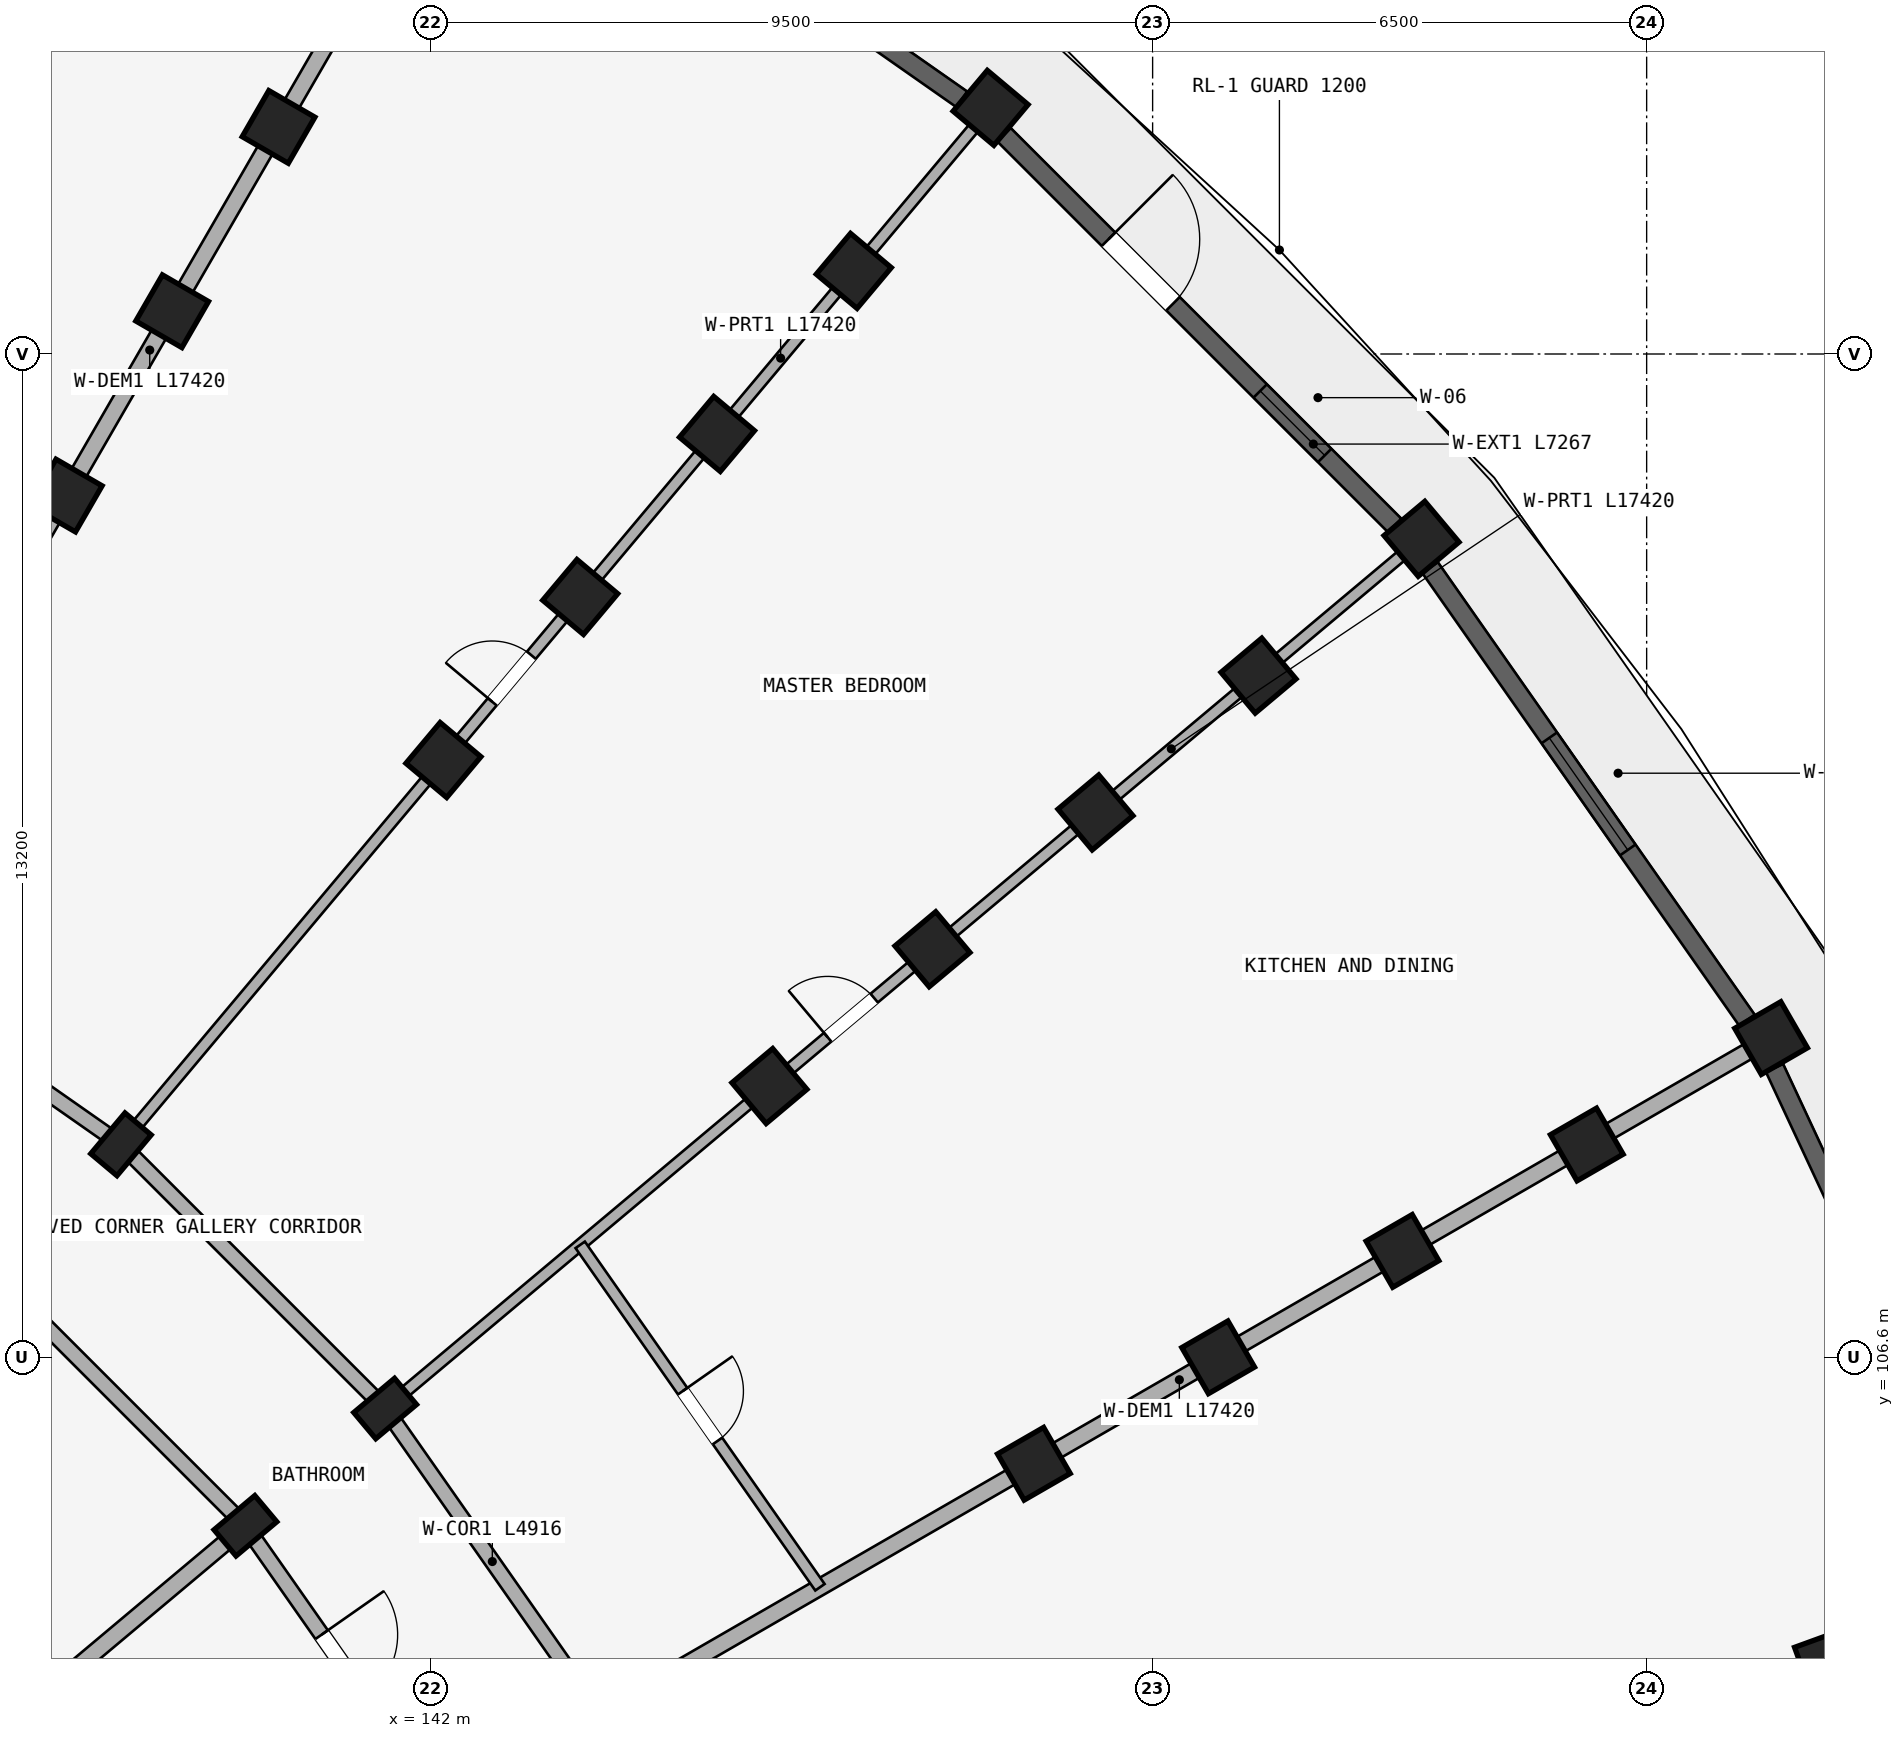
"""IFC4 building model, lengths in metres.
Left out: names, types, materials, properties, quantities, classifications, styles, units other than length and angle.
Written with IfcOpenShell. Run it as: python <this file> out.ifc"""

import sys

from ifc_helpers import new_model, si_unit, direction, frame, frame_2d, origin, origin_2d, place, context, subcontext, project, spatial, rectangle, extrude, element, fill, save


model = new_model("IFC4")
c1 = context("Model", 3, precision=1e-05, world=origin(), true_north=direction((0.0, 1.0)))
c2 = subcontext(c1, "Body", "Model", "MODEL_VIEW")
j1 = project(units=[si_unit("LENGTHUNIT", "METRE"), si_unit("PLANEANGLEUNIT", "RADIAN")], contexts=[c1])
p1 = place(None, origin())
s1 = spatial("IfcSite", under=j1, at=p1, CompositionType="ELEMENT")
p2 = place(p1, origin())
s2 = spatial("IfcBuilding", under=s1, at=p2, CompositionType="ELEMENT")
p3 = place(p2, frame((0.0, 0.0, 24.45)))
s3 = spatial("IfcBuildingStorey", under=s2, at=p3, CompositionType="ELEMENT", Elevation=24.45)
for number, where, z_axis, x_axis in (
    (1, (137.2, 117.938, 0.0), (0.0, 0.0, 1.0), (-0.866, 0.5, 0.0)),
    (2, (138.6, 120.363, 0.0), (0.0, 0.0, 1.0), (-0.866, 0.5, 0.0)),
    (3, (140.0, 122.787, 0.0), (0.0, 0.0, 1.0), (-0.866, 0.5, 0.0)),
):
    element("IfcColumn", number, at=place(p3, frame(where, z_axis=z_axis, x_axis=x_axis)), inside=s3, PredefinedType="COLUMN", context=c2, shape_type="SweptSolid", body=[
        extrude(rectangle(XDim=0.7, YDim=0.7, at=origin_2d()), origin(), (0.0, 0.0, 1.0), 2.93),
    ])
p4 = place(p3, frame((137.927, 109.402, 0.0), z_axis=(0.0, 0.0, 1.0), x_axis=(-0.766044443119, 0.642787609687, 0.0)))
e4 = element("IfcColumn", 4, at=p4, inside=s3, PredefinedType="COLUMN", context=c2, shape_type="SweptSolid", body=[
    extrude(rectangle(XDim=0.45, YDim=0.7, at=origin_2d()), origin(), (0.0, 0.0, 1.0), 2.93),
])
for number, where, z_axis, x_axis in (
    (5, (142.169, 114.458, 0.0), (0.0, 0.0, 1.0), (-0.766, 0.643, 0.0)),
    (6, (143.969, 116.603, 0.0), (0.0, 0.0, 1.0), (-0.766, 0.643, 0.0)),
    (7, (145.769, 118.748, 0.0), (0.0, 0.0, 1.0), (-0.766, 0.643, 0.0)),
    (8, (147.568, 120.893, 0.0), (0.0, 0.0, 1.0), (-0.766, 0.643, 0.0)),
    (9, (149.368, 123.038, 0.0), (0.0, 0.0, 1.0), (-0.766, 0.643, 0.0)),
):
    element("IfcColumn", number, at=place(p3, frame(where, z_axis=z_axis, x_axis=x_axis)), inside=s3, PredefinedType="COLUMN", context=c2, shape_type="SweptSolid", body=[
        extrude(rectangle(XDim=0.7, YDim=0.7, at=origin_2d()), origin(), (0.0, 0.0, 1.0), 2.93),
    ])
for number, where, z_axis, x_axis in (
    (10, (139.564, 104.384, 0.0), (0.0, 0.0, 1.0), (-0.643, 0.766, 0.0)),
    (11, (141.402, 105.927, 0.0), (0.0, 0.0, 1.0), (-0.643, 0.766, 0.0)),
):
    element("IfcColumn", number, at=place(p3, frame(where, z_axis=z_axis, x_axis=x_axis)), inside=s3, PredefinedType="COLUMN", context=c2, shape_type="SweptSolid", body=[
        extrude(rectangle(XDim=0.45, YDim=0.7, at=origin_2d()), origin(), (0.0, 0.0, 1.0), 2.93),
    ])
for number, where, z_axis, x_axis in (
    (12, (146.458, 110.169, 0.0), (0.0, 0.0, 1.0), (-0.643, 0.766, 0.0)),
    (13, (148.603, 111.969, 0.0), (0.0, 0.0, 1.0), (-0.643, 0.766, 0.0)),
    (14, (150.748, 113.769, 0.0), (0.0, 0.0, 1.0), (-0.643, 0.766, 0.0)),
    (15, (152.893, 115.568, 0.0), (0.0, 0.0, 1.0), (-0.643, 0.766, 0.0)),
    (16, (155.038, 117.368, 0.0), (0.0, 0.0, 1.0), (-0.643, 0.766, 0.0)),
    (17, (149.938, 105.2, 0.0), (0.0, 0.0, 1.0), (-0.5, 0.866, 0.0)),
    (18, (152.363, 106.6, 0.0), (0.0, 0.0, 1.0), (-0.5, 0.866, 0.0)),
    (19, (154.787, 108.0, 0.0), (0.0, 0.0, 1.0), (-0.5, 0.866, 0.0)),
    (20, (157.212, 109.4, 0.0), (0.0, 0.0, 1.0), (-0.5, 0.866, 0.0)),
    (21, (159.637, 110.8, 0.0), (0.0, 0.0, 1.0), (-0.5, 0.866, 0.0)),
    (22, (160.395, 102.575, 0.0), (0.0, 0.0, 1.0), (-0.342, 0.94, 0.0)),
):
    element("IfcColumn", number, at=place(p3, frame(where, z_axis=z_axis, x_axis=x_axis)), inside=s3, PredefinedType="COLUMN", context=c2, shape_type="SweptSolid", body=[
        extrude(rectangle(XDim=0.7, YDim=0.7, at=origin_2d()), origin(), (0.0, 0.0, 1.0), 2.93),
    ])
p5 = place(p3, frame((133.9, 112.222, 0.0), z_axis=(0.0, 0.0, 1.0), x_axis=(0.819140911474, -0.573592335331, 0.0)))
e23 = element("IfcWall", 23, at=p5, inside=s3, PredefinedType="STANDARD", context=c2, shape_type="SweptSolid", body=[
    extrude(rectangle(XDim=4.916, YDim=0.2, at=frame_2d((2.458, 0.0))), origin(), (0.0, 0.0, 1.0), 2.372),
])
p6 = place(p5, frame((1.888, 0.0, 0.0)))
e24 = element("IfcOpeningElement", 24, at=p6, cuts=e23, PredefinedType="OPENING", context=c2, shape_type="SweptSolid", body=[
    extrude(rectangle(XDim=1.14, YDim=2.15, at=frame_2d((0.57, 1.075))), frame((0.0, 0.11, 0.0), z_axis=(0.0, -1.0, 0.0), x_axis=(1.0, 0.0, 0.0)), (0.0, 0.0, 1.0), 0.22),
])
p7 = place(p3, frame((136.384, 107.564, 0.0), z_axis=(0.0, 0.0, 1.0), x_axis=(0.707106781187, -0.707106781187, 0.0)))
e25 = element("IfcWall", 25, at=p7, inside=s3, PredefinedType="STANDARD", context=c2, shape_type="SweptSolid", body=[
    extrude(rectangle(XDim=4.497, YDim=0.2, at=frame_2d((2.249, 0.0))), origin(), (0.0, 0.0, 1.0), 2.372),
])
p8 = place(p3, frame((137.927, 109.402, 0.0), z_axis=(0.0, 0.0, 1.0), x_axis=(0.707106781187, -0.707106781187, 0.0)))
e26 = element("IfcWall", 26, at=p8, inside=s3, PredefinedType="STANDARD", context=c2, shape_type="SweptSolid", body=[
    extrude(rectangle(XDim=4.916, YDim=0.2, at=frame_2d((2.458, 0.0))), origin(), (0.0, 0.0, 1.0), 2.372),
])
p9 = place(p3, frame((139.564, 104.384, 0.0), z_axis=(0.0, 0.0, 1.0), x_axis=(0.573571637217, -0.819155404658, 0.0)))
e27 = element("IfcWall", 27, at=p9, inside=s3, PredefinedType="STANDARD", context=c2, shape_type="SweptSolid", body=[
    extrude(rectangle(XDim=4.497, YDim=0.2, at=frame_2d((2.249, 0.0))), origin(), (0.0, 0.0, 1.0), 2.372),
])
p10 = place(p9, frame((1.749, 0.0, 0.0)))
e28 = element("IfcOpeningElement", 28, at=p10, cuts=e27, PredefinedType="OPENING", context=c2, shape_type="SweptSolid", body=[
    extrude(rectangle(XDim=1.0, YDim=2.15, at=frame_2d((0.5, 1.075))), frame((0.0, 0.11, 0.0), z_axis=(0.0, -1.0, 0.0), x_axis=(1.0, 0.0, 0.0)), (0.0, 0.0, 1.0), 0.22),
])
p11 = place(p3, frame((141.402, 105.927, 0.0), z_axis=(0.0, 0.0, 1.0), x_axis=(0.573592335331, -0.819140911474, 0.0)))
e29 = element("IfcWall", 29, at=p11, inside=s3, PredefinedType="STANDARD", context=c2, shape_type="SweptSolid", body=[
    extrude(rectangle(XDim=4.916, YDim=0.2, at=frame_2d((2.458, 0.0))), origin(), (0.0, 0.0, 1.0), 2.372),
])
p12 = place(p3, frame((133.95, 112.309, 0.0), z_axis=(0.0, 0.0, 1.0), x_axis=(0.499997843263, 0.866026648973, 0.0)))
e30 = element("IfcWall", 30, at=p12, inside=s3, PredefinedType="STANDARD", context=c2, shape_type="SweptSolid", body=[
    extrude(rectangle(XDim=17.42, YDim=0.22, at=frame_2d((8.71, 0.0))), origin(), (0.0, 0.0, 1.0), 2.372),
])
p13 = place(p3, frame((137.991, 109.479, 0.0), z_axis=(0.0, 0.0, 1.0), x_axis=(0.642784757967, 0.766046835987, 0.0)))
e31 = element("IfcWall", 31, at=p13, inside=s3, PredefinedType="PARTITIONING", context=c2, shape_type="SweptSolid", body=[
    extrude(rectangle(XDim=17.42, YDim=0.15, at=frame_2d((8.71, 0.0))), origin(), (0.0, 0.0, 1.0), 2.372),
])
p14 = place(p13, frame((7.5, 0.0, 0.0)))
e32 = element("IfcOpeningElement", 32, at=p14, cuts=e31, PredefinedType="OPENING", context=c2, shape_type="SweptSolid", body=[
    extrude(rectangle(XDim=0.8, YDim=2.1, at=frame_2d((0.4, 1.05))), frame((0.0, 0.085, 0.0), z_axis=(0.0, -1.0, 0.0), x_axis=(1.0, 0.0, 0.0)), (0.0, 0.0, 1.0), 0.17),
])
p15 = place(p3, frame((134.355, 100.013, 0.0), z_axis=(0.0, 0.0, 1.0), x_axis=(0.766046761698, 0.642784846501, 0.0)))
e33 = element("IfcWall", 33, at=p15, inside=s3, PredefinedType="STANDARD", context=c2, shape_type="SweptSolid", body=[
    extrude(rectangle(XDim=6.75, YDim=0.22, at=frame_2d((3.375, 0.0))), origin(), (0.0, 0.0, 1.0), 2.372),
])
p16 = place(p3, frame((141.479, 105.991, 0.0), z_axis=(0.0, 0.0, 1.0), x_axis=(0.766046835987, 0.642784757967, 0.0)))
e34 = element("IfcWall", 34, at=p16, inside=s3, PredefinedType="PARTITIONING", context=c2, shape_type="SweptSolid", body=[
    extrude(rectangle(XDim=17.42, YDim=0.15, at=frame_2d((8.71, 0.0))), origin(), (0.0, 0.0, 1.0), 2.372),
])
p17 = place(p16, frame((7.5, 0.0, 0.0)))
e35 = element("IfcOpeningElement", 35, at=p17, cuts=e34, PredefinedType="OPENING", context=c2, shape_type="SweptSolid", body=[
    extrude(rectangle(XDim=0.8, YDim=2.1, at=frame_2d((0.4, 1.05))), frame((0.0, 0.085, 0.0), z_axis=(0.0, -1.0, 0.0), x_axis=(1.0, 0.0, 0.0)), (0.0, 0.0, 1.0), 0.17),
])
p18 = place(p3, frame((144.309, 101.95, 0.0), z_axis=(0.0, 0.0, 1.0), x_axis=(0.866026648973, 0.499997843263, 0.0)))
e36 = element("IfcWall", 36, at=p18, inside=s3, PredefinedType="STANDARD", context=c2, shape_type="SweptSolid", body=[
    extrude(rectangle(XDim=17.42, YDim=0.22, at=frame_2d((8.71, 0.0))), origin(), (0.0, 0.0, 1.0), 2.372),
])
p19 = place(p3, frame((146.393, 97.479, 0.0), z_axis=(0.0, 0.0, 1.0), x_axis=(0.939691901159, 0.342022120477, 0.0)))
e37 = element("IfcWall", 37, at=p19, inside=s3, PredefinedType="PARTITIONING", context=c2, shape_type="SweptSolid", body=[
    extrude(rectangle(XDim=17.42, YDim=0.15, at=frame_2d((8.71, 0.0))), origin(), (0.0, 0.0, 1.0), 2.372),
])
p20 = place(p19, frame((7.5, 0.0, 0.0)))
e38 = element("IfcOpeningElement", 38, at=p20, cuts=e37, PredefinedType="OPENING", context=c2, shape_type="SweptSolid", body=[
    extrude(rectangle(XDim=0.8, YDim=2.1, at=frame_2d((0.4, 1.05))), frame((0.0, 0.085, 0.0), z_axis=(0.0, -1.0, 0.0), x_axis=(1.0, 0.0, 0.0)), (0.0, 0.0, 1.0), 0.17),
])
p21 = place(p3, frame((143.969, 108.08, 0.0), z_axis=(0.0, 0.0, 1.0), x_axis=(0.573569599955, -0.819156831143, 0.0)))
e39 = element("IfcWall", 39, at=p21, inside=s3, PredefinedType="PLUMBINGWALL", context=c2, shape_type="SweptSolid", body=[
    extrude(rectangle(XDim=5.5, YDim=0.15, at=frame_2d((2.75, 0.0))), origin(), (0.0, 0.0, 1.0), 2.372),
])
p22 = place(p21, frame((2.35, 0.0, 0.0)))
e40 = element("IfcOpeningElement", 40, at=p22, cuts=e39, PredefinedType="OPENING", context=c2, shape_type="SweptSolid", body=[
    extrude(rectangle(XDim=0.8, YDim=2.1, at=frame_2d((0.4, 1.05))), frame((0.0, 0.085, 0.0), z_axis=(0.0, -1.0, 0.0), x_axis=(1.0, 0.0, 0.0)), (0.0, 0.0, 1.0), 0.17),
])
p23 = place(p3, frame((143.036, 127.319, 0.0), z_axis=(0.0, 0.0, 1.0), x_axis=(0.819159308599, -0.573566061701, 0.0)))
e41 = element("IfcWall", 41, at=p23, inside=s3, PredefinedType="STANDARD", context=c2, shape_type="SweptSolid", body=[
    extrude(rectangle(XDim=7.267, YDim=0.25, at=frame_2d((3.633, 0.0))), origin(), (0.0, 0.0, 1.0), 2.372),
])
p24 = place(p23, frame((2.583, 0.0, 0.372)))
e42 = element("IfcOpeningElement", 42, at=p24, cuts=e41, PredefinedType="OPENING", context=c2, shape_type="SweptSolid", body=[
    extrude(rectangle(XDim=2.1, YDim=1.8, at=frame_2d((1.05, 0.9))), frame((0.0, 0.135, 0.0), z_axis=(0.0, -1.0, 0.0), x_axis=(1.0, 0.0, 0.0)), (0.0, 0.0, 1.0), 0.27),
])
p25 = place(p3, frame((149.546, 122.684, 0.0), z_axis=(0.0, 0.0, 1.0), x_axis=(0.707106781187, -0.707106781187, 0.0)))
e43 = element("IfcWall", 43, at=p25, inside=s3, PredefinedType="STANDARD", context=c2, shape_type="SweptSolid", body=[
    extrude(rectangle(XDim=7.267, YDim=0.25, at=frame_2d((3.633, 0.0))), origin(), (0.0, 0.0, 1.0), 2.372),
])
p26 = place(p25, frame((4.766, 0.0, 0.322)))
e44 = element("IfcOpeningElement", 44, at=p26, cuts=e43, PredefinedType="OPENING", context=c2, shape_type="SweptSolid", body=[
    extrude(rectangle(XDim=1.2, YDim=1.5, at=frame_2d((0.6, 0.75))), frame((0.0, 0.135, 0.0), z_axis=(0.0, -1.0, 0.0), x_axis=(1.0, 0.0, 0.0)), (0.0, 0.0, 1.0), 0.27),
])
p27 = place(p25, frame((1.943, 0.0, 0.0)))
e45 = element("IfcOpeningElement", 45, at=p27, cuts=e43, PredefinedType="OPENING", context=c2, shape_type="SweptSolid", body=[
    extrude(rectangle(XDim=1.2, YDim=2.15, at=frame_2d((0.6, 1.075))), frame((0.0, 0.135, 0.0), z_axis=(0.0, -1.0, 0.0), x_axis=(1.0, 0.0, 0.0)), (0.0, 0.0, 1.0), 0.27),
])
p28 = place(p3, frame((155.151, 116.989, 0.0), z_axis=(0.0, 0.0, 1.0), x_axis=(0.573566061701, -0.819159308599, 0.0)))
e46 = element("IfcWall", 46, at=p28, inside=s3, PredefinedType="STANDARD", context=c2, shape_type="SweptSolid", body=[
    extrude(rectangle(XDim=7.267, YDim=0.25, at=frame_2d((3.633, 0.0))), origin(), (0.0, 0.0, 1.0), 2.372),
])
p29 = place(p28, frame((2.733, 0.0, 0.522)))
e47 = element("IfcOpeningElement", 47, at=p29, cuts=e46, PredefinedType="OPENING", context=c2, shape_type="SweptSolid", body=[
    extrude(rectangle(XDim=1.8, YDim=1.65, at=frame_2d((0.9, 0.825))), frame((0.0, 0.135, 0.0), z_axis=(0.0, -1.0, 0.0), x_axis=(1.0, 0.0, 0.0)), (0.0, 0.0, 1.0), 0.27),
])
p30 = place(p3, frame((159.683, 110.406, 0.0), z_axis=(0.0, 0.0, 1.0), x_axis=(0.422627946127, -0.90630327107, 0.0)))
e48 = element("IfcWall", 48, at=p30, inside=s3, PredefinedType="STANDARD", context=c2, shape_type="SweptSolid", body=[
    extrude(rectangle(XDim=7.267, YDim=0.25, at=frame_2d((3.633, 0.0))), origin(), (0.0, 0.0, 1.0), 2.372),
])
p31 = place(p30, frame((2.808, 0.0, 0.422)))
e49 = element("IfcOpeningElement", 49, at=p31, cuts=e48, PredefinedType="OPENING", context=c2, shape_type="SweptSolid", body=[
    extrude(rectangle(XDim=1.65, YDim=1.75, at=frame_2d((0.825, 0.875))), frame((0.0, 0.135, 0.0), z_axis=(0.0, -1.0, 0.0), x_axis=(1.0, 0.0, 0.0)), (0.0, 0.0, 1.0), 0.27),
])
p32 = place(p26, origin())
e50 = element("IfcWindow", 50, at=p32, inside=s3, PartitioningType="SINGLE_PANEL", PredefinedType="WINDOW", context=c2, shape_type="SweptSolid", body=[
    extrude(rectangle(XDim=1.2, YDim=1.5, at=frame_2d((0.6, 0.75))), frame((0.0, 0.03, 0.0), z_axis=(0.0, -1.0, 0.0), x_axis=(1.0, 0.0, 0.0)), (0.0, 0.0, 1.0), 0.06),
])
fill(e44, e50)
p33 = place(p29, origin())
e51 = element("IfcWindow", 51, at=p33, inside=s3, PartitioningType="DOUBLE_PANEL_VERTICAL", PredefinedType="WINDOW", context=c2, shape_type="SweptSolid", body=[
    extrude(rectangle(XDim=1.8, YDim=1.65, at=frame_2d((0.9, 0.825))), frame((0.0, 0.03, 0.0), z_axis=(0.0, -1.0, 0.0), x_axis=(1.0, 0.0, 0.0)), (0.0, 0.0, 1.0), 0.06),
])
fill(e47, e51)
p34 = place(p14, frame((0.8, 0.0, 0.0), z_axis=(0.0, 0.0, 1.0), x_axis=(-1.0, 0.0, 0.0)))
e52 = element("IfcDoor", 52, at=p34, inside=s3, OperationType="SINGLE_SWING_RIGHT", PredefinedType="DOOR", context=c2, shape_type="SweptSolid", body=[
    extrude(rectangle(XDim=0.8, YDim=2.1, at=frame_2d((0.4, 1.05))), frame((0.0, 0.025, 0.0), z_axis=(0.0, -1.0, 0.0), x_axis=(1.0, 0.0, 0.0)), (0.0, 0.0, 1.0), 0.05),
])
fill(e32, e52)
p35 = place(p17, origin())
e53 = element("IfcDoor", 53, at=p35, inside=s3, OperationType="SINGLE_SWING_LEFT", PredefinedType="DOOR", context=c2, shape_type="SweptSolid", body=[
    extrude(rectangle(XDim=0.8, YDim=2.1, at=frame_2d((0.4, 1.05))), frame((0.0, 0.025, 0.0), z_axis=(0.0, -1.0, 0.0), x_axis=(1.0, 0.0, 0.0)), (0.0, 0.0, 1.0), 0.05),
])
fill(e35, e53)
p36 = place(p22, origin())
e54 = element("IfcDoor", 54, at=p36, inside=s3, OperationType="SINGLE_SWING_LEFT", PredefinedType="DOOR", context=c2, shape_type="SweptSolid", body=[
    extrude(rectangle(XDim=0.8, YDim=2.1, at=frame_2d((0.4, 1.05))), frame((0.0, 0.025, 0.0), z_axis=(0.0, -1.0, 0.0), x_axis=(1.0, 0.0, 0.0)), (0.0, 0.0, 1.0), 0.05),
])
fill(e40, e54)
p37 = place(p10, origin())
e55 = element("IfcDoor", 55, at=p37, inside=s3, OperationType="SINGLE_SWING_LEFT", PredefinedType="DOOR", context=c2, shape_type="SweptSolid", body=[
    extrude(rectangle(XDim=1.0, YDim=2.15, at=frame_2d((0.5, 1.075))), frame((0.0, 0.025, 0.0), z_axis=(0.0, -1.0, 0.0), x_axis=(1.0, 0.0, 0.0)), (0.0, 0.0, 1.0), 0.05),
])
fill(e28, e55)
p38 = place(p27, origin())
e56 = element("IfcDoor", 56, at=p38, inside=s3, OperationType="SINGLE_SWING_LEFT", PredefinedType="DOOR", context=c2, shape_type="SweptSolid", body=[
    extrude(rectangle(XDim=1.2, YDim=2.15, at=frame_2d((0.6, 1.075))), frame((0.0, 0.025, 0.0), z_axis=(0.0, -1.0, 0.0), x_axis=(1.0, 0.0, 0.0)), (0.0, 0.0, 1.0), 0.05),
])
fill(e45, e56)
save(model, sys.argv[1])
